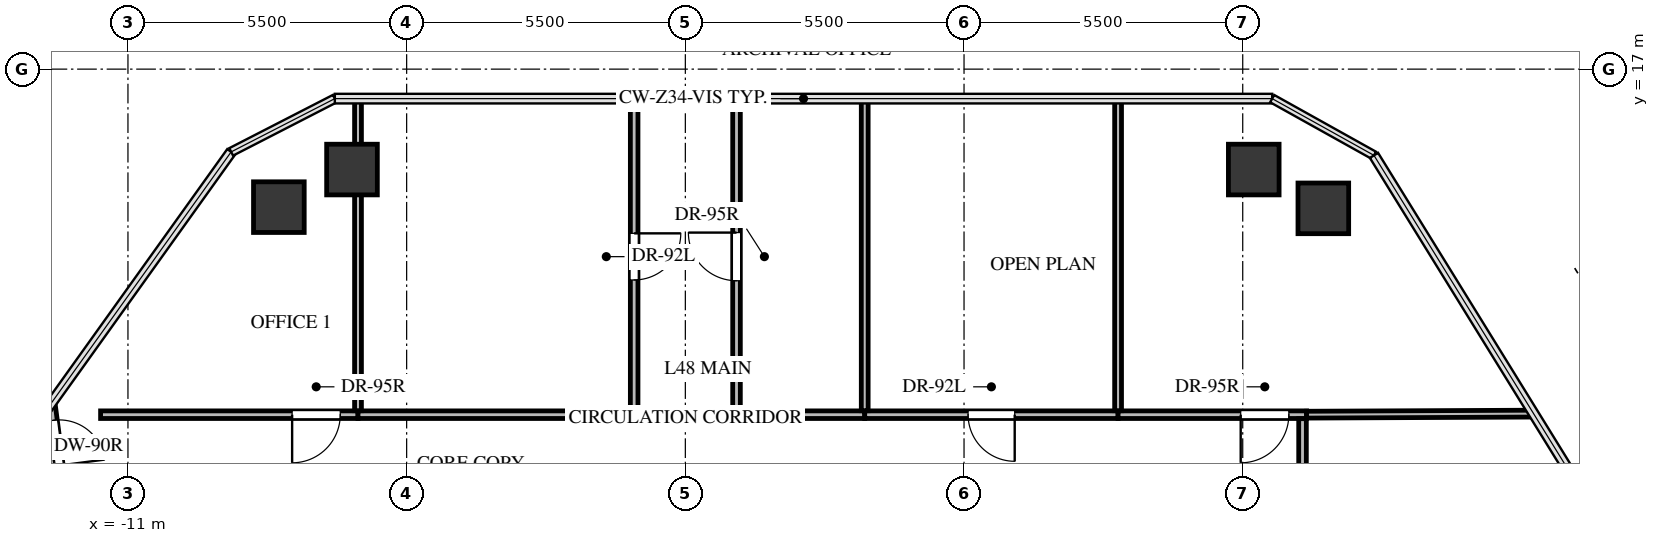
"""IFC4 building model, lengths in metres.
Left out: names, types, materials, properties, quantities, classifications, styles, units other than length and angle.
Written with IfcOpenShell. Run it as: python <this file> out.ifc"""

import sys

from ifc_helpers import new_model, si_unit, direction, frame, frame_2d, origin, origin_2d, place, context, subcontext, project, spatial, rectangle, extrude, source, transform, mapped, element, fill, save


model = new_model("IFC4")
c1 = context("Model", 3, precision=1e-05, world=origin(), true_north=direction((0.0, 1.0)))
c2 = subcontext(c1, "Body", "Model", "MODEL_VIEW")
j1 = project(units=[si_unit("LENGTHUNIT", "METRE"), si_unit("PLANEANGLEUNIT", "RADIAN")], contexts=[c1])
p1 = place(None, origin())
s1 = spatial("IfcSite", under=j1, at=p1, CompositionType="ELEMENT")
p2 = place(p1, origin())
s2 = spatial("IfcBuilding", under=s1, at=p2, CompositionType="ELEMENT")
p3 = place(p2, frame((0.0, 0.0, 177.1)))
s3 = spatial("IfcBuildingStorey", under=s2, at=p3, CompositionType="ELEMENT", Elevation=177.1)
m1 = source(origin(), c2, "Body", "SweptSolid", [
    extrude(rectangle(XDim=1.0, YDim=1.0, at=origin_2d()), origin(), (0.0, 0.0, 1.0), 3.3),
])
for number, where, z_axis, x_axis in (
    (1, (-8.022, 14.276, -0.24), (0.0, 0.0, 1.0), (1.0, 0.0, 0.0)),
    (2, (-6.579, 15.018, -0.24), (0.0, 0.0, 1.0), (1.0, 0.0, 0.0)),
    (3, (11.218, 15.018, -0.24), (0.0, 0.0, 1.0), (1.0, 0.0, 0.0)),
    (4, (12.591, 14.252, -0.24), (0.0, 0.0, 1.0), (1.0, 0.0, 0.0)),
):
    element("IfcColumn", number, at=place(p3, frame(where, z_axis=z_axis, x_axis=x_axis)), inside=s3, PredefinedType="COLUMN", context=c2, shape_type="MappedRepresentation", body=[
        mapped(m1, transform((0.0, 0.0, 0.0), x_axis=(1.0, 0.0, 0.0), y_axis=(0.0, 1.0, 0.0), z_axis=(0.0, 0.0, 1.0), scale=1.0)),
    ])
p4 = place(p3, frame((-6.46, 10.18, 0.0), z_axis=(0.0, 0.0, 1.0), x_axis=(-1.0, 0.0, 0.0)))
e5 = element("IfcWall", 5, at=p4, inside=s3, PredefinedType="PARTITIONING", context=c2, shape_type="SweptSolid", body=[
    extrude(rectangle(XDim=5.08, YDim=0.15, at=frame_2d((2.54, 0.0))), origin(), (0.0, 0.0, 1.0), 2.242),
])
p5 = place(p4, frame((0.35, 0.0, 0.0)))
e6 = element("IfcOpeningElement", 6, at=p5, cuts=e5, PredefinedType="OPENING", context=c2, shape_type="SweptSolid", body=[
    extrude(rectangle(XDim=0.95, YDim=2.1, at=frame_2d((0.475, 1.05))), frame((0.0, 0.085, 0.0), z_axis=(0.0, -1.0, 0.0), x_axis=(1.0, 0.0, 0.0)), (0.0, 0.0, 1.0), 0.17),
])
p6 = place(p3, frame((-1.01, 16.418, 0.0), z_axis=(0.0, 0.0, 1.0), x_axis=(0.0, -1.0, 0.0)))
e7 = element("IfcWall", 7, at=p6, inside=s3, PredefinedType="PARTITIONING", context=c2, shape_type="SweptSolid", body=[
    extrude(rectangle(XDim=6.238, YDim=0.15, at=frame_2d((3.119, 0.0))), origin(), (0.0, 0.0, 1.0), 2.399),
])
p7 = place(p6, frame((2.659, 0.0, 0.0)))
e8 = element("IfcOpeningElement", 8, at=p7, cuts=e7, PredefinedType="OPENING", context=c2, shape_type="SweptSolid", body=[
    extrude(rectangle(XDim=0.92, YDim=2.1, at=frame_2d((0.46, 1.05))), frame((0.0, 0.085, 0.0), z_axis=(0.0, -1.0, 0.0), x_axis=(1.0, 0.0, 0.0)), (0.0, 0.0, 1.0), 0.17),
])
p8 = place(p3, frame((-1.089, 10.18, 0.0), z_axis=(0.0, 0.0, 1.0), x_axis=(-1.0, 0.0, 0.0)))
e9 = element("IfcWall", 9, at=p8, inside=s3, PredefinedType="PARTITIONING", context=c2, shape_type="SweptSolid", body=[
    extrude(rectangle(XDim=5.371, YDim=0.15, at=frame_2d((2.686, 0.0))), origin(), (0.0, 0.0, 1.0), 2.242),
])
p9 = place(p3, frame((1.01, 10.18, 0.0), z_axis=(0.0, 0.0, 1.0), x_axis=(0.0, 1.0, 0.0)))
e10 = element("IfcWall", 10, at=p9, inside=s3, PredefinedType="PARTITIONING", context=c2, shape_type="SweptSolid", body=[
    extrude(rectangle(XDim=6.238, YDim=0.15, at=frame_2d((3.119, 0.0))), origin(), (0.0, 0.0, 1.0), 2.399),
])
p10 = place(p9, frame((2.644, 0.0, 0.0)))
e11 = element("IfcOpeningElement", 11, at=p10, cuts=e10, PredefinedType="OPENING", context=c2, shape_type="SweptSolid", body=[
    extrude(rectangle(XDim=0.95, YDim=2.1, at=frame_2d((0.475, 1.05))), frame((0.0, 0.085, 0.0), z_axis=(0.0, -1.0, 0.0), x_axis=(1.0, 0.0, 0.0)), (0.0, 0.0, 1.0), 0.17),
])
p11 = place(p3, frame((3.54, 10.18, 0.0), z_axis=(0.0, 0.0, 1.0), x_axis=(-1.0, 0.0, 0.0)))
e12 = element("IfcWall", 12, at=p11, inside=s3, PredefinedType="PARTITIONING", context=c2, shape_type="SweptSolid", body=[
    extrude(rectangle(XDim=2.451, YDim=0.15, at=frame_2d((1.226, 0.0))), origin(), (0.0, 0.0, 1.0), 3.045),
])
p12 = place(p3, frame((8.54, 10.18, 0.0), z_axis=(0.0, 0.0, 1.0), x_axis=(-1.0, 0.0, 0.0)))
e13 = element("IfcWall", 13, at=p12, inside=s3, PredefinedType="PARTITIONING", context=c2, shape_type="SweptSolid", body=[
    extrude(rectangle(XDim=5.0, YDim=0.15, at=frame_2d((2.5, 0.0))), origin(), (0.0, 0.0, 1.0), 2.608),
])
p13 = place(p12, frame((2.04, 0.0, 0.0)))
e14 = element("IfcOpeningElement", 14, at=p13, cuts=e13, PredefinedType="OPENING", context=c2, shape_type="SweptSolid", body=[
    extrude(rectangle(XDim=0.92, YDim=2.1, at=frame_2d((0.46, 1.05))), frame((0.0, 0.085, 0.0), z_axis=(0.0, -1.0, 0.0), x_axis=(1.0, 0.0, 0.0)), (0.0, 0.0, 1.0), 0.17),
])
p14 = place(p3, frame((12.26, 10.18, 0.0), z_axis=(0.0, 0.0, 1.0), x_axis=(-1.0, 0.0, 0.0)))
e15 = element("IfcWall", 15, at=p14, inside=s3, PredefinedType="PARTITIONING", context=c2, shape_type="SweptSolid", body=[
    extrude(rectangle(XDim=3.72, YDim=0.15, at=frame_2d((1.86, 0.0))), origin(), (0.0, 0.0, 1.0), 2.242),
])
p15 = place(p14, frame((0.35, 0.0, 0.0)))
e16 = element("IfcOpeningElement", 16, at=p15, cuts=e15, PredefinedType="OPENING", context=c2, shape_type="SweptSolid", body=[
    extrude(rectangle(XDim=0.95, YDim=2.1, at=frame_2d((0.475, 1.05))), frame((0.0, 0.085, 0.0), z_axis=(0.0, -1.0, 0.0), x_axis=(1.0, 0.0, 0.0)), (0.0, 0.0, 1.0), 0.17),
])
p16 = place(p3, frame((-12.514, 10.406, 0.0), z_axis=(0.0, 0.0, 1.0), x_axis=(0.129378833178, -0.991595238757, 0.0)))
e17 = element("IfcWall", 17, at=p16, inside=s3, PredefinedType="PARTITIONING", context=c2, shape_type="SweptSolid", body=[
    extrude(rectangle(XDim=1.579, YDim=0.15, at=frame_2d((0.79, 0.0))), origin(), (0.0, 0.0, 1.0), 3.045),
])
p17 = place(p16, frame((0.34, 0.0, 0.0)))
e18 = element("IfcOpeningElement", 18, at=p17, cuts=e17, PredefinedType="OPENING", context=c2, shape_type="SweptSolid", body=[
    extrude(rectangle(XDim=0.9, YDim=2.05, at=frame_2d((0.45, 1.025))), frame((0.0, 0.085, 0.0), z_axis=(0.0, -1.0, 0.0), x_axis=(1.0, 0.0, 0.0)), (0.0, 0.0, 1.0), 0.17),
])
p18 = place(p3, frame((12.18, 2.49, 0.0), z_axis=(0.0, 0.0, 1.0), x_axis=(0.0, 1.0, 0.0)))
e19 = element("IfcWall", 19, at=p18, inside=s3, PredefinedType="PARTITIONING", context=c2, shape_type="SweptSolid", body=[
    extrude(rectangle(XDim=7.611, YDim=0.15, at=frame_2d((3.806, 0.0))), origin(), (0.0, 0.0, 1.0), 3.045),
])
p19 = place(p18, frame((3.331, 0.0, 0.0)))
e20 = element("IfcOpeningElement", 20, at=p19, cuts=e19, PredefinedType="OPENING", context=c2, shape_type="SweptSolid", body=[
    extrude(rectangle(XDim=0.95, YDim=2.1, at=frame_2d((0.475, 1.05))), frame((0.0, 0.085, 0.0), z_axis=(0.0, -1.0, 0.0), x_axis=(1.0, 0.0, 0.0)), (0.0, 0.0, 1.0), 0.17),
])
p20 = place(p3, frame((-6.46, 15.102, 0.0), z_axis=(0.0, 0.0, 1.0), x_axis=(0.0, -1.0, 0.0)))
e21 = element("IfcWall", 21, at=p20, inside=s3, PredefinedType="PARTITIONING", context=c2, shape_type="SweptSolid", body=[
    extrude(rectangle(XDim=4.843, YDim=0.135, at=frame_2d((2.421, 0.0))), origin(), (0.0, 0.0, 1.0), 2.242),
])
p21 = place(p3, frame((-6.46, 16.418, 0.0), z_axis=(0.0, 0.0, 1.0), x_axis=(0.0, -1.0, 0.0)))
e22 = element("IfcWall", 22, at=p21, inside=s3, PredefinedType="PARTITIONING", context=c2, shape_type="SweptSolid", body=[
    extrude(rectangle(XDim=1.316, YDim=0.135, at=frame_2d((0.658, 0.0))), origin(), (0.0, 0.0, 1.0), 1.877),
])
for number, where, z_axis, x_axis in (
    (23, (3.54, 16.418, 0.0), (0.0, 0.0, 1.0), (0.0, -1.0, 0.0)),
    (24, (8.54, 16.418, 0.0), (0.0, 0.0, 1.0), (0.0, -1.0, 0.0)),
):
    element("IfcWall", number, at=place(p3, frame(where, z_axis=z_axis, x_axis=x_axis)), inside=s3, PredefinedType="PARTITIONING", context=c2, shape_type="SweptSolid", body=[
        extrude(rectangle(XDim=6.159, YDim=0.135, at=frame_2d((3.08, 0.0))), origin(), (0.0, 0.0, 1.0), 2.399),
    ])
p22 = place(p3, frame((16.74, 10.201, 0.0), z_axis=(0.0, 0.0, 1.0), x_axis=(-0.999989522694, -0.004577608714, 0.0)))
e25 = element("IfcWall", 25, at=p22, inside=s3, PredefinedType="PARTITIONING", context=c2, shape_type="SweptSolid", body=[
    extrude(rectangle(XDim=4.48, YDim=0.135, at=frame_2d((2.24, 0.0))), origin(), (0.0, 0.0, 1.0), 2.399),
])
m2 = source(origin(), c2, "Body", "SweptSolid", [
    extrude(rectangle(XDim=0.95, YDim=2.1, at=frame_2d((0.475, 1.05))), frame((0.0, 0.025, 0.0), z_axis=(0.0, -1.0, 0.0), x_axis=(1.0, 0.0, 0.0)), (0.0, 0.0, 1.0), 0.05),
])
p23 = place(p5, origin())
e26 = element("IfcDoor", 26, at=p23, inside=s3, OperationType="SINGLE_SWING_RIGHT", PredefinedType="DOOR", context=c2, shape_type="MappedRepresentation", body=[
    mapped(m2, transform((0.0, 0.0, 0.0), x_axis=(1.0, 0.0, 0.0), y_axis=(0.0, 1.0, 0.0), z_axis=(0.0, 0.0, 1.0), scale=1.0)),
])
fill(e6, e26)
m3 = source(origin(), c2, "Body", "SweptSolid", [
    extrude(rectangle(XDim=0.92, YDim=2.1, at=frame_2d((0.46, 1.05))), frame((0.0, 0.025, 0.0), z_axis=(0.0, -1.0, 0.0), x_axis=(1.0, 0.0, 0.0)), (0.0, 0.0, 1.0), 0.05),
])
p24 = place(p7, origin())
e27 = element("IfcDoor", 27, at=p24, inside=s3, OperationType="SINGLE_SWING_LEFT", PredefinedType="DOOR", context=c2, shape_type="MappedRepresentation", body=[
    mapped(m3, transform((0.0, 0.0, 0.0), x_axis=(1.0, 0.0, 0.0), y_axis=(0.0, 1.0, 0.0), z_axis=(0.0, 0.0, 1.0), scale=1.0)),
])
fill(e8, e27)
p25 = place(p10, origin())
e28 = element("IfcDoor", 28, at=p25, inside=s3, OperationType="SINGLE_SWING_RIGHT", PredefinedType="DOOR", context=c2, shape_type="MappedRepresentation", body=[
    mapped(m2, transform((0.0, 0.0, 0.0), x_axis=(1.0, 0.0, 0.0), y_axis=(0.0, 1.0, 0.0), z_axis=(0.0, 0.0, 1.0), scale=1.0)),
])
fill(e11, e28)
p26 = place(p13, origin())
e29 = element("IfcDoor", 29, at=p26, inside=s3, OperationType="SINGLE_SWING_LEFT", PredefinedType="DOOR", context=c2, shape_type="MappedRepresentation", body=[
    mapped(m3, transform((0.0, 0.0, 0.0), x_axis=(1.0, 0.0, 0.0), y_axis=(0.0, 1.0, 0.0), z_axis=(0.0, 0.0, 1.0), scale=1.0)),
])
fill(e14, e29)
p27 = place(p15, origin())
e30 = element("IfcDoor", 30, at=p27, inside=s3, OperationType="SINGLE_SWING_RIGHT", PredefinedType="DOOR", context=c2, shape_type="MappedRepresentation", body=[
    mapped(m2, transform((0.0, 0.0, 0.0), x_axis=(1.0, 0.0, 0.0), y_axis=(0.0, 1.0, 0.0), z_axis=(0.0, 0.0, 1.0), scale=1.0)),
])
fill(e16, e30)
m4 = source(origin(), c2, "Body", "SweptSolid", [
    extrude(rectangle(XDim=0.9, YDim=2.05, at=frame_2d((0.45, 1.025))), frame((0.0, 0.025, 0.0), z_axis=(0.0, -1.0, 0.0), x_axis=(1.0, 0.0, 0.0)), (0.0, 0.0, 1.0), 0.05),
])
p28 = place(p17, origin())
e31 = element("IfcDoor", 31, at=p28, inside=s3, OperationType="SINGLE_SWING_RIGHT", PredefinedType="DOOR", context=c2, shape_type="MappedRepresentation", body=[
    mapped(m4, transform((0.0, 0.0, 0.0), x_axis=(1.0, 0.0, 0.0), y_axis=(0.0, 1.0, 0.0), z_axis=(0.0, 0.0, 1.0), scale=1.0)),
])
fill(e18, e31)
save(model, sys.argv[1])
